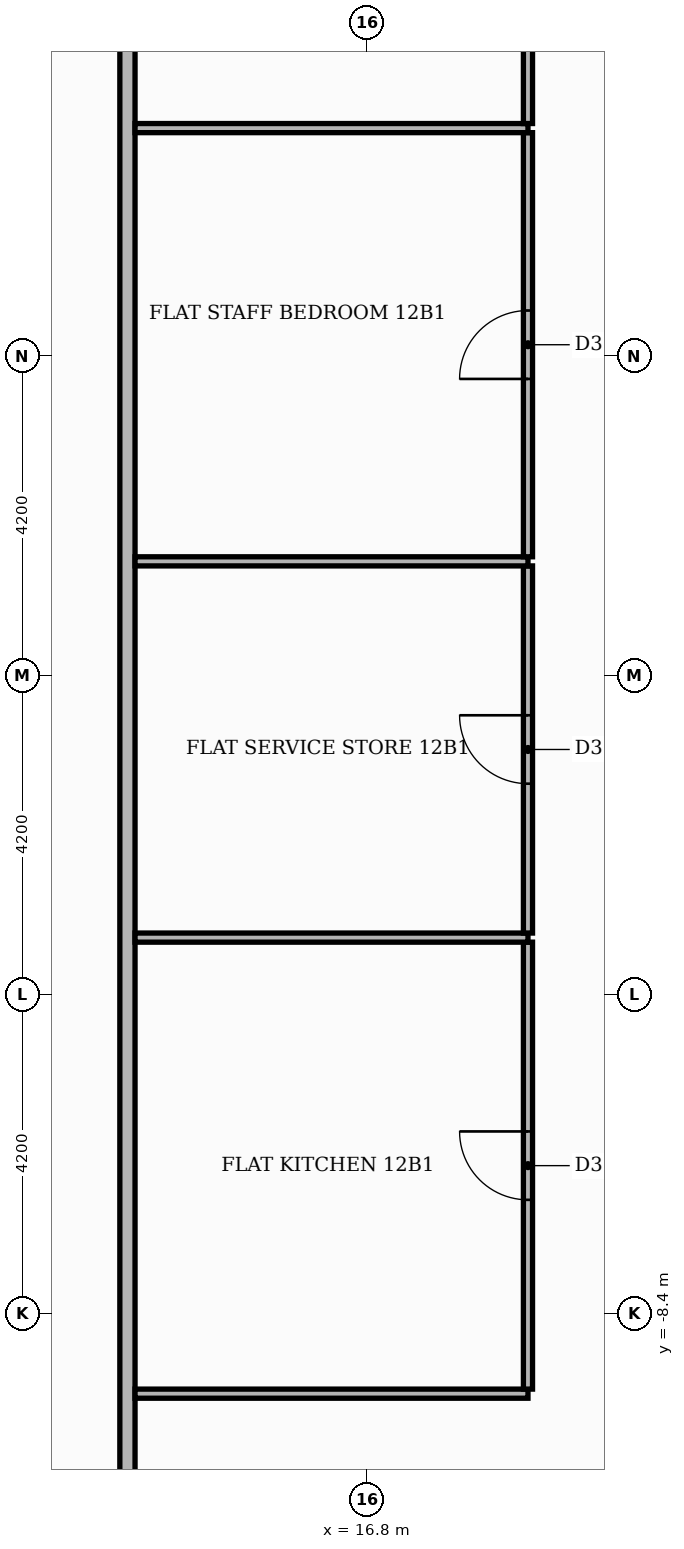
"""IFC4 building model, lengths in metres.
Left out: names, types, materials, properties, quantities, classifications, styles, units other than length and angle.
Written with IfcOpenShell. Run it as: python <this file> out.ifc"""

import sys

from ifc_helpers import new_model, si_unit, direction, frame, frame_2d, origin, place, context, subcontext, project, spatial, rectangle, extrude, element, fill, save


model = new_model("IFC4")
c1 = context("Model", 3, precision=1e-05, world=origin(), true_north=direction((0.0, 1.0)))
c2 = subcontext(c1, "Body", "Model", "MODEL_VIEW")
j1 = project(units=[si_unit("LENGTHUNIT", "METRE"), si_unit("PLANEANGLEUNIT", "RADIAN")], contexts=[c1])
p1 = place(None, origin())
s1 = spatial("IfcSite", under=j1, at=p1, CompositionType="ELEMENT")
p2 = place(p1, origin())
s2 = spatial("IfcBuilding", under=s1, at=p2, CompositionType="ELEMENT")
p3 = place(p2, frame((0.0, 0.0, 54.3)))
s3 = spatial("IfcBuildingStorey", under=s2, at=p3, CompositionType="ELEMENT", Elevation=54.3)
p4 = place(p3, frame((13.65, -13.55, 0.0), z_axis=(0.0, 0.0, 1.0), x_axis=(0.0, 1.0, 0.0)))
e1 = element("IfcWall", 1, at=p4, inside=s3, PredefinedType="PARTITIONING", context=c2, shape_type="SweptSolid", body=[
    extrude(rectangle(XDim=27.1, YDim=0.2, at=frame_2d((13.55, 0.0))), origin(), (0.0, 0.0, 1.0), 3.48),
])
p5 = place(p4, frame((1.45, 0.0, 0.0)))
e2 = element("IfcOpeningElement", 2, at=p5, cuts=e1, PredefinedType="OPENING", context=c2, shape_type="SweptSolid", body=[
    extrude(rectangle(XDim=1.1, YDim=2.4, at=frame_2d((0.55, 1.2))), frame((0.0, 0.11, 0.0), z_axis=(0.0, -1.0, 0.0), x_axis=(1.0, 0.0, 0.0)), (0.0, 0.0, 1.0), 0.22),
])
p6 = place(p3, frame((13.75, -9.45, 0.0), z_axis=(0.0, 0.0, 1.0), x_axis=(1.0, 0.0, 0.0)))
e3 = element("IfcWall", 3, at=p6, inside=s3, PredefinedType="PARTITIONING", context=c2, shape_type="SweptSolid", body=[
    extrude(rectangle(XDim=5.17, YDim=0.12, at=frame_2d((2.585, 0.0))), origin(), (0.0, 0.0, 1.0), 3.48),
])
p7 = place(p3, frame((18.92, -9.39, 0.0), z_axis=(0.0, 0.0, 1.0), x_axis=(0.0, 1.0, 0.0)))
e4 = element("IfcWall", 4, at=p7, inside=s3, PredefinedType="PARTITIONING", context=c2, shape_type="SweptSolid", body=[
    extrude(rectangle(XDim=5.88, YDim=0.12, at=frame_2d((2.94, 0.0))), origin(), (0.0, 0.0, 1.0), 3.48),
])
p8 = place(p7, frame((2.49, 0.0, 0.0)))
e5 = element("IfcOpeningElement", 5, at=p8, cuts=e4, PredefinedType="OPENING", context=c2, shape_type="SweptSolid", body=[
    extrude(rectangle(XDim=0.9, YDim=2.1, at=frame_2d((0.45, 1.05))), frame((0.0, 0.07, 0.0), z_axis=(0.0, -1.0, 0.0), x_axis=(1.0, 0.0, 0.0)), (0.0, 0.0, 1.0), 0.14),
])
p9 = place(p3, frame((13.75, -3.45, 0.0), z_axis=(0.0, 0.0, 1.0), x_axis=(1.0, 0.0, 0.0)))
e6 = element("IfcWall", 6, at=p9, inside=s3, PredefinedType="PARTITIONING", context=c2, shape_type="SweptSolid", body=[
    extrude(rectangle(XDim=5.17, YDim=0.12, at=frame_2d((2.585, 0.0))), origin(), (0.0, 0.0, 1.0), 3.48),
])
p10 = place(p3, frame((18.92, -3.39, 0.0), z_axis=(0.0, 0.0, 1.0), x_axis=(0.0, 1.0, 0.0)))
e7 = element("IfcWall", 7, at=p10, inside=s3, PredefinedType="PARTITIONING", context=c2, shape_type="SweptSolid", body=[
    extrude(rectangle(XDim=4.83, YDim=0.12, at=frame_2d((2.415, 0.0))), origin(), (0.0, 0.0, 1.0), 3.48),
])
p11 = place(p10, frame((1.965, 0.0, 0.0)))
e8 = element("IfcOpeningElement", 8, at=p11, cuts=e7, PredefinedType="OPENING", context=c2, shape_type="SweptSolid", body=[
    extrude(rectangle(XDim=0.9, YDim=2.1, at=frame_2d((0.45, 1.05))), frame((0.0, 0.07, 0.0), z_axis=(0.0, -1.0, 0.0), x_axis=(1.0, 0.0, 0.0)), (0.0, 0.0, 1.0), 0.14),
])
p12 = place(p3, frame((13.75, 1.5, 0.0), z_axis=(0.0, 0.0, 1.0), x_axis=(1.0, 0.0, 0.0)))
e9 = element("IfcWall", 9, at=p12, inside=s3, PredefinedType="PARTITIONING", context=c2, shape_type="SweptSolid", body=[
    extrude(rectangle(XDim=5.17, YDim=0.12, at=frame_2d((2.585, 0.0))), origin(), (0.0, 0.0, 1.0), 3.48),
])
p13 = place(p3, frame((18.92, 1.56, 0.0), z_axis=(0.0, 0.0, 1.0), x_axis=(0.0, 1.0, 0.0)))
e10 = element("IfcWall", 10, at=p13, inside=s3, PredefinedType="PARTITIONING", context=c2, shape_type="SweptSolid", body=[
    extrude(rectangle(XDim=5.58, YDim=0.12, at=frame_2d((2.79, 0.0))), origin(), (0.0, 0.0, 1.0), 3.48),
])
p14 = place(p13, frame((2.34, 0.0, 0.0)))
e11 = element("IfcOpeningElement", 11, at=p14, cuts=e10, PredefinedType="OPENING", context=c2, shape_type="SweptSolid", body=[
    extrude(rectangle(XDim=0.9, YDim=2.1, at=frame_2d((0.45, 1.05))), frame((0.0, 0.07, 0.0), z_axis=(0.0, -1.0, 0.0), x_axis=(1.0, 0.0, 0.0)), (0.0, 0.0, 1.0), 0.14),
])
p15 = place(p3, frame((13.75, 7.2, 0.0), z_axis=(0.0, 0.0, 1.0), x_axis=(1.0, 0.0, 0.0)))
e12 = element("IfcWall", 12, at=p15, inside=s3, PredefinedType="PARTITIONING", context=c2, shape_type="SweptSolid", body=[
    extrude(rectangle(XDim=5.17, YDim=0.12, at=frame_2d((2.585, 0.0))), origin(), (0.0, 0.0, 1.0), 3.48),
])
p16 = place(p3, frame((18.92, 7.26, 0.0), z_axis=(0.0, 0.0, 1.0), x_axis=(0.0, 1.0, 0.0)))
e13 = element("IfcWall", 13, at=p16, inside=s3, PredefinedType="PARTITIONING", context=c2, shape_type="SweptSolid", body=[
    extrude(rectangle(XDim=3.63, YDim=0.12, at=frame_2d((1.815, 0.0))), origin(), (0.0, 0.0, 1.0), 3.48),
])
p17 = place(p16, frame((1.365, 0.0, 0.0)))
e14 = element("IfcOpeningElement", 14, at=p17, cuts=e13, PredefinedType="OPENING", context=c2, shape_type="SweptSolid", body=[
    extrude(rectangle(XDim=0.9, YDim=2.1, at=frame_2d((0.45, 1.05))), frame((0.0, 0.07, 0.0), z_axis=(0.0, -1.0, 0.0), x_axis=(1.0, 0.0, 0.0)), (0.0, 0.0, 1.0), 0.14),
])
p18 = place(p8, origin())
e15 = element("IfcDoor", 15, at=p18, inside=s3, OperationType="SINGLE_SWING_RIGHT", PredefinedType="DOOR", context=c2, shape_type="SweptSolid", body=[
    extrude(rectangle(XDim=0.9, YDim=2.1, at=frame_2d((0.45, 1.05))), frame((0.0, 0.025, 0.0), z_axis=(0.0, -1.0, 0.0), x_axis=(1.0, 0.0, 0.0)), (0.0, 0.0, 1.0), 0.05),
])
fill(e5, e15)
p19 = place(p11, origin())
e16 = element("IfcDoor", 16, at=p19, inside=s3, OperationType="SINGLE_SWING_RIGHT", PredefinedType="DOOR", context=c2, shape_type="SweptSolid", body=[
    extrude(rectangle(XDim=0.9, YDim=2.1, at=frame_2d((0.45, 1.05))), frame((0.0, 0.025, 0.0), z_axis=(0.0, -1.0, 0.0), x_axis=(1.0, 0.0, 0.0)), (0.0, 0.0, 1.0), 0.05),
])
fill(e8, e16)
p20 = place(p14, origin())
e17 = element("IfcDoor", 17, at=p20, inside=s3, OperationType="SINGLE_SWING_LEFT", PredefinedType="DOOR", context=c2, shape_type="SweptSolid", body=[
    extrude(rectangle(XDim=0.9, YDim=2.1, at=frame_2d((0.45, 1.05))), frame((0.0, 0.025, 0.0), z_axis=(0.0, -1.0, 0.0), x_axis=(1.0, 0.0, 0.0)), (0.0, 0.0, 1.0), 0.05),
])
fill(e11, e17)
save(model, sys.argv[1])
